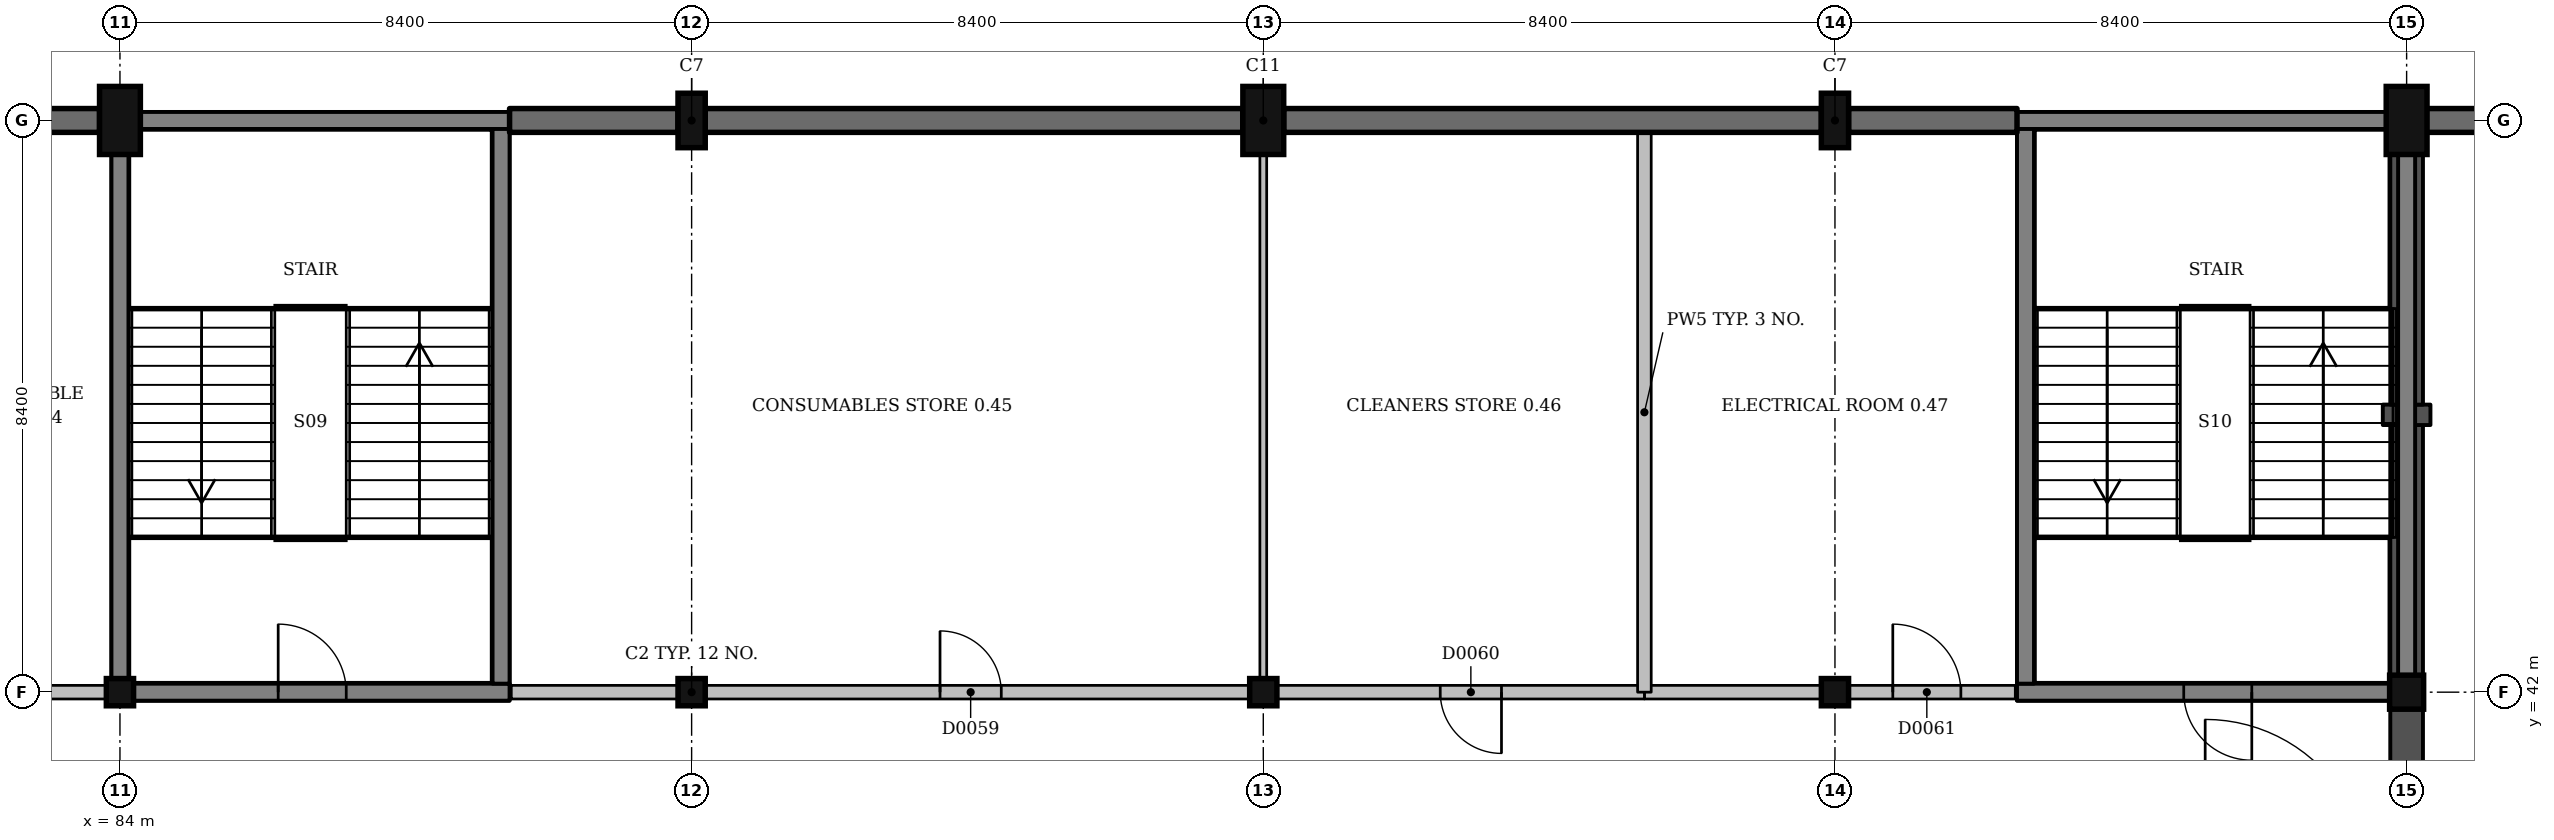
"""IFC4 building model, lengths in metres.
Left out: names, types, materials, properties, quantities, classifications, styles, units other than length and angle.
Written with IfcOpenShell. Run it as: python <this file> out.ifc"""

import sys

from ifc_helpers import new_model, si_unit, direction, frame, frame_2d, origin, origin_2d, place, context, subcontext, project, spatial, rectangle, extrude, element, fill, save


model = new_model("IFC4")
c1 = context("Model", 3, precision=1e-05, world=origin(), true_north=direction((0.0, 1.0)))
c2 = subcontext(c1, "Body", "Model", "MODEL_VIEW")
j1 = project(units=[si_unit("LENGTHUNIT", "METRE"), si_unit("PLANEANGLEUNIT", "RADIAN")], contexts=[c1])
p1 = place(None, origin())
s1 = spatial("IfcSite", under=j1, at=p1, CompositionType="ELEMENT")
p2 = place(p1, origin())
s2 = spatial("IfcBuilding", under=s1, at=p2, CompositionType="ELEMENT")
p3 = place(p2, origin())
s3 = spatial("IfcBuildingStorey", under=s2, at=p3, CompositionType="ELEMENT", Elevation=0.0)
p4 = place(p3, frame((84.0, 42.0, -1.5), z_axis=(0.0, 0.0, 1.0), x_axis=(1.0, 0.0, 0.0)))
e1 = element("IfcColumn", 1, at=p4, inside=s3, PredefinedType="COLUMN", context=c2, shape_type="SweptSolid", body=[
    extrude(rectangle(XDim=0.4, YDim=0.4, at=origin_2d()), origin(), (0.0, 0.0, 1.0), 6.0),
])
p5 = place(p3, frame((84.0, 50.4, -1.5), z_axis=(0.0, 0.0, 1.0), x_axis=(1.0, 0.0, 0.0)))
e2 = element("IfcColumn", 2, at=p5, inside=s3, PredefinedType="COLUMN", context=c2, shape_type="SweptSolid", body=[
    extrude(rectangle(XDim=0.6, YDim=1.0, at=origin_2d()), origin(), (0.0, 0.0, 1.0), 6.0),
])
p6 = place(p3, frame((92.4, 42.0, -1.5), z_axis=(0.0, 0.0, 1.0), x_axis=(1.0, 0.0, 0.0)))
e3 = element("IfcColumn", 3, at=p6, inside=s3, PredefinedType="COLUMN", context=c2, shape_type="SweptSolid", body=[
    extrude(rectangle(XDim=0.4, YDim=0.4, at=origin_2d()), origin(), (0.0, 0.0, 1.0), 6.0),
])
p7 = place(p3, frame((92.4, 50.4, -0.35), z_axis=(0.0, 0.0, 1.0), x_axis=(1.0, 0.0, 0.0)))
e4 = element("IfcColumn", 4, at=p7, inside=s3, PredefinedType="COLUMN", context=c2, shape_type="SweptSolid", body=[
    extrude(rectangle(XDim=0.4, YDim=0.8, at=origin_2d()), origin(), (0.0, 0.0, 1.0), 4.85),
])
p8 = place(p3, frame((100.8, 42.0, -1.5), z_axis=(0.0, 0.0, 1.0), x_axis=(1.0, 0.0, 0.0)))
e5 = element("IfcColumn", 5, at=p8, inside=s3, PredefinedType="COLUMN", context=c2, shape_type="SweptSolid", body=[
    extrude(rectangle(XDim=0.4, YDim=0.4, at=origin_2d()), origin(), (0.0, 0.0, 1.0), 6.0),
])
p9 = place(p3, frame((100.8, 50.4, -0.35), z_axis=(0.0, 0.0, 1.0), x_axis=(1.0, 0.0, 0.0)))
e6 = element("IfcColumn", 6, at=p9, inside=s3, PredefinedType="COLUMN", context=c2, shape_type="SweptSolid", body=[
    extrude(rectangle(XDim=0.6, YDim=1.0, at=origin_2d()), origin(), (0.0, 0.0, 1.0), 4.85),
])
p10 = place(p3, frame((109.2, 42.0, -1.5), z_axis=(0.0, 0.0, 1.0), x_axis=(1.0, 0.0, 0.0)))
e7 = element("IfcColumn", 7, at=p10, inside=s3, PredefinedType="COLUMN", context=c2, shape_type="SweptSolid", body=[
    extrude(rectangle(XDim=0.4, YDim=0.4, at=origin_2d()), origin(), (0.0, 0.0, 1.0), 6.0),
])
p11 = place(p3, frame((109.2, 50.4, -0.35), z_axis=(0.0, 0.0, 1.0), x_axis=(1.0, 0.0, 0.0)))
e8 = element("IfcColumn", 8, at=p11, inside=s3, PredefinedType="COLUMN", context=c2, shape_type="SweptSolid", body=[
    extrude(rectangle(XDim=0.4, YDim=0.8, at=origin_2d()), origin(), (0.0, 0.0, 1.0), 4.85),
])
p12 = place(p3, frame((117.6, 42.0, -1.5), z_axis=(0.0, 0.0, 1.0), x_axis=(1.0, 0.0, 0.0)))
e9 = element("IfcColumn", 9, at=p12, inside=s3, PredefinedType="COLUMN", context=c2, shape_type="SweptSolid", body=[
    extrude(rectangle(XDim=0.5, YDim=0.5, at=origin_2d()), origin(), (0.0, 0.0, 1.0), 6.0),
])
p13 = place(p3, frame((117.6, 50.4, -0.35), z_axis=(0.0, 0.0, 1.0), x_axis=(1.0, 0.0, 0.0)))
e10 = element("IfcColumn", 10, at=p13, inside=s3, PredefinedType="COLUMN", context=c2, shape_type="SweptSolid", body=[
    extrude(rectangle(XDim=0.6, YDim=1.0, at=origin_2d()), origin(), (0.0, 0.0, 1.0), 4.85),
])
p14 = place(p3, frame((84.2, 42.0, 0.0), z_axis=(0.0, 0.0, 1.0), x_axis=(1.0, 0.0, 0.0)))
e11 = element("IfcWall", 11, at=p14, inside=s3, PredefinedType="SHEAR", context=c2, shape_type="SweptSolid", body=[
    extrude(rectangle(XDim=5.525, YDim=0.25, at=frame_2d((2.763, 0.0))), origin(), (0.0, 0.0, 1.0), 4.5),
])
p15 = place(p14, frame((2.125, 0.0, 0.0)))
e12 = element("IfcOpeningElement", 12, at=p15, cuts=e11, PredefinedType="OPENING", context=c2, shape_type="SweptSolid", body=[
    extrude(rectangle(XDim=1.0, YDim=2.1, at=frame_2d((0.5, 1.05))), frame((0.0, 0.135, 0.0), z_axis=(0.0, -1.0, 0.0), x_axis=(1.0, 0.0, 0.0)), (0.0, 0.0, 1.0), 0.27),
])
p16 = place(p3, frame((84.3, 50.4, 0.0), z_axis=(0.0, 0.0, 1.0), x_axis=(1.0, 0.0, 0.0)))
e13 = element("IfcWall", 13, at=p16, inside=s3, PredefinedType="SHEAR", context=c2, shape_type="SweptSolid", body=[
    extrude(rectangle(XDim=5.425, YDim=0.25, at=frame_2d((2.712, 0.0))), origin(), (0.0, 0.0, 1.0), 4.5),
])
p17 = place(p3, frame((84.0, 42.2, 0.0), z_axis=(0.0, 0.0, 1.0), x_axis=(0.0, 1.0, 0.0)))
e14 = element("IfcWall", 14, at=p17, inside=s3, PredefinedType="SHEAR", context=c2, shape_type="SweptSolid", body=[
    extrude(rectangle(XDim=7.7, YDim=0.25, at=frame_2d((3.85, 0.0))), origin(), (0.0, 0.0, 1.0), 4.5),
])
p18 = place(p3, frame((89.6, 42.125, 0.0), z_axis=(0.0, 0.0, 1.0), x_axis=(0.0, 1.0, 0.0)))
e15 = element("IfcWall", 15, at=p18, inside=s3, PredefinedType="SHEAR", context=c2, shape_type="SweptSolid", body=[
    extrude(rectangle(XDim=8.15, YDim=0.25, at=frame_2d((4.075, 0.0))), origin(), (0.0, 0.0, 1.0), 4.5),
])
p19 = place(p3, frame((111.875, 42.0, 0.0), z_axis=(0.0, 0.0, 1.0), x_axis=(1.0, 0.0, 0.0)))
e16 = element("IfcWall", 16, at=p19, inside=s3, PredefinedType="SHEAR", context=c2, shape_type="SweptSolid", body=[
    extrude(rectangle(XDim=5.475, YDim=0.25, at=frame_2d((2.738, 0.0))), origin(), (0.0, 0.0, 1.0), 4.5),
])
p20 = place(p19, frame((2.45, 0.0, 0.0)))
e17 = element("IfcOpeningElement", 17, at=p20, cuts=e16, PredefinedType="OPENING", context=c2, shape_type="SweptSolid", body=[
    extrude(rectangle(XDim=1.0, YDim=2.1, at=frame_2d((0.5, 1.05))), frame((0.0, 0.135, 0.0), z_axis=(0.0, -1.0, 0.0), x_axis=(1.0, 0.0, 0.0)), (0.0, 0.0, 1.0), 0.27),
])
p21 = place(p3, frame((111.875, 50.4, 0.0), z_axis=(0.0, 0.0, 1.0), x_axis=(1.0, 0.0, 0.0)))
e18 = element("IfcWall", 18, at=p21, inside=s3, PredefinedType="SHEAR", context=c2, shape_type="SweptSolid", body=[
    extrude(rectangle(XDim=5.425, YDim=0.25, at=frame_2d((2.712, 0.0))), origin(), (0.0, 0.0, 1.0), 4.5),
])
p22 = place(p3, frame((112.0, 42.125, 0.0), z_axis=(0.0, 0.0, 1.0), x_axis=(0.0, 1.0, 0.0)))
e19 = element("IfcWall", 19, at=p22, inside=s3, PredefinedType="SHEAR", context=c2, shape_type="SweptSolid", body=[
    extrude(rectangle(XDim=8.15, YDim=0.25, at=frame_2d((4.075, 0.0))), origin(), (0.0, 0.0, 1.0), 4.5),
])
for number, where, z_axis, x_axis in (
    (20, (83.875, 42.0, -1.5), (0.0, 0.0, 1.0), (1.0, 0.0, 0.0)),
    (21, (83.875, 50.4, -1.5), (0.0, 0.0, 1.0), (1.0, 0.0, 0.0)),
):
    element("IfcWall", number, at=place(p3, frame(where, z_axis=z_axis, x_axis=x_axis)), inside=s3, PredefinedType="SHEAR", context=c2, shape_type="SweptSolid", body=[
        extrude(rectangle(XDim=5.85, YDim=0.25, at=frame_2d((2.925, 0.0))), origin(), (0.0, 0.0, 1.0), 1.5),
    ])
for number, where, z_axis, x_axis in (
    (22, (84.0, 42.125, -1.5), (0.0, 0.0, 1.0), (0.0, 1.0, 0.0)),
    (23, (89.6, 42.125, -1.5), (0.0, 0.0, 1.0), (0.0, 1.0, 0.0)),
):
    element("IfcWall", number, at=place(p3, frame(where, z_axis=z_axis, x_axis=x_axis)), inside=s3, PredefinedType="SHEAR", context=c2, shape_type="SweptSolid", body=[
        extrude(rectangle(XDim=8.15, YDim=0.25, at=frame_2d((4.075, 0.0))), origin(), (0.0, 0.0, 1.0), 1.5),
    ])
for number, where, z_axis, x_axis in (
    (24, (111.875, 42.0, -1.5), (0.0, 0.0, 1.0), (1.0, 0.0, 0.0)),
    (25, (111.875, 50.4, -1.5), (0.0, 0.0, 1.0), (1.0, 0.0, 0.0)),
):
    element("IfcWall", number, at=place(p3, frame(where, z_axis=z_axis, x_axis=x_axis)), inside=s3, PredefinedType="SHEAR", context=c2, shape_type="SweptSolid", body=[
        extrude(rectangle(XDim=5.85, YDim=0.25, at=frame_2d((2.925, 0.0))), origin(), (0.0, 0.0, 1.0), 1.5),
    ])
for number, where, z_axis, x_axis in (
    (26, (112.0, 42.125, -1.5), (0.0, 0.0, 1.0), (0.0, 1.0, 0.0)),
    (27, (117.6, 42.125, -1.5), (0.0, 0.0, 1.0), (0.0, 1.0, 0.0)),
):
    element("IfcWall", number, at=place(p3, frame(where, z_axis=z_axis, x_axis=x_axis)), inside=s3, PredefinedType="SHEAR", context=c2, shape_type="SweptSolid", body=[
        extrude(rectangle(XDim=8.15, YDim=0.25, at=frame_2d((4.075, 0.0))), origin(), (0.0, 0.0, 1.0), 1.5),
    ])
for number, where, z_axis, x_axis in (
    (28, (109.0, 50.4, -0.35), (0.0, 0.0, 1.0), (-1.0, 0.0, 0.0)),
    (29, (100.5, 50.4, -0.35), (0.0, 0.0, 1.0), (-1.0, 0.0, 0.0)),
    (30, (83.7, 50.4, -0.35), (0.0, 0.0, 1.0), (-1.0, 0.0, 0.0)),
):
    element("IfcWall", number, at=place(p3, frame(where, z_axis=z_axis, x_axis=x_axis)), inside=s3, PredefinedType="SOLIDWALL", context=c2, shape_type="SweptSolid", body=[
        extrude(rectangle(XDim=7.9, YDim=0.35, at=frame_2d((3.95, 0.0))), origin(), (0.0, 0.0, 1.0), 3.8),
    ])
p23 = place(p3, frame((117.6, 50.4, 0.0), z_axis=(0.0, 0.0, 1.0), x_axis=(1.0, 0.0, 0.0)))
e31 = element("IfcWall", 31, at=p23, inside=s3, PredefinedType="SOLIDWALL", context=c2, shape_type="SweptSolid", body=[
    extrude(rectangle(XDim=8.4, YDim=0.35, at=frame_2d((4.2, 0.0))), origin(), (0.0, 0.0, 1.0), 4.25),
])
p24 = place(p3, frame((117.6, 37.95, 0.0), z_axis=(0.0, 0.0, 1.0), x_axis=(0.0, 1.0, 0.0)))
e32 = element("IfcWall", 32, at=p24, inside=s3, PredefinedType="SOLIDWALL", context=c2, shape_type="SweptSolid", body=[
    extrude(rectangle(XDim=3.8, YDim=0.48, at=frame_2d((1.9, 0.0))), origin(), (0.0, 0.0, 1.0), 3.75),
])
p25 = place(p24, frame((2.4, 0.0, 0.0), z_axis=(0.0, 0.0, 1.0), x_axis=(-1.0, 0.0, 0.0)))
e33 = element("IfcOpeningElement", 33, at=p25, cuts=e32, PredefinedType="OPENING", context=c2, shape_type="SweptSolid", body=[
    extrude(rectangle(XDim=1.0, YDim=2.1, at=frame_2d((0.5, 1.05))), frame((0.0, 0.25, 0.0), z_axis=(0.0, -1.0, 0.0), x_axis=(1.0, 0.0, 0.0)), (0.0, 0.0, 1.0), 0.5),
])
p26 = place(p3, frame((117.6, 42.25, 0.0), z_axis=(0.0, 0.0, 1.0), x_axis=(0.0, 1.0, 0.0)))
e34 = element("IfcWall", 34, at=p26, inside=s3, PredefinedType="SOLIDWALL", context=c2, shape_type="SweptSolid", body=[
    extrude(rectangle(XDim=3.675, YDim=0.48, at=frame_2d((1.837, 0.0))), origin(), (0.0, 0.0, 1.0), 3.75),
])
p27 = place(p3, frame((117.6, 45.925, 0.0), z_axis=(0.0, 0.0, 1.0), x_axis=(0.0, 1.0, 0.0)))
e35 = element("IfcWall", 35, at=p27, inside=s3, PredefinedType="SOLIDWALL", context=c2, shape_type="SweptSolid", body=[
    extrude(rectangle(XDim=0.3, YDim=0.7, at=frame_2d((0.15, 0.0))), origin(), (0.0, 0.0, 1.0), 3.75),
])
p28 = place(p3, frame((117.6, 46.225, 0.0), z_axis=(0.0, 0.0, 1.0), x_axis=(0.0, 1.0, 0.0)))
e36 = element("IfcWall", 36, at=p28, inside=s3, PredefinedType="SOLIDWALL", context=c2, shape_type="SweptSolid", body=[
    extrude(rectangle(XDim=3.675, YDim=0.48, at=frame_2d((1.837, 0.0))), origin(), (0.0, 0.0, 1.0), 3.75),
])
p29 = place(p3, frame((106.4, 42.0, 0.0), z_axis=(0.0, 0.0, 1.0), x_axis=(1.0, 0.0, 0.0)))
e37 = element("IfcWall", 37, at=p29, inside=s3, PredefinedType="PARTITIONING", context=c2, shape_type="SweptSolid", body=[
    extrude(rectangle(XDim=2.6, YDim=0.2, at=frame_2d((1.3, 0.0))), origin(), (0.0, 0.0, 1.0), 3.45),
])
p30 = place(p3, frame((109.4, 42.0, 0.0), z_axis=(0.0, 0.0, 1.0), x_axis=(1.0, 0.0, 0.0)))
e38 = element("IfcWall", 38, at=p30, inside=s3, PredefinedType="PARTITIONING", context=c2, shape_type="SweptSolid", body=[
    extrude(rectangle(XDim=2.45, YDim=0.2, at=frame_2d((1.225, 0.0))), origin(), (0.0, 0.0, 1.0), 3.45),
])
p31 = place(p30, frame((0.65, 0.0, 0.0)))
e39 = element("IfcOpeningElement", 39, at=p31, cuts=e38, PredefinedType="OPENING", context=c2, shape_type="SweptSolid", body=[
    extrude(rectangle(XDim=1.0, YDim=2.1, at=frame_2d((0.5, 1.05))), frame((0.0, 0.11, 0.0), z_axis=(0.0, -1.0, 0.0), x_axis=(1.0, 0.0, 0.0)), (0.0, 0.0, 1.0), 0.22),
])
p32 = place(p3, frame((75.8, 42.0, 0.0), z_axis=(0.0, 0.0, 1.0), x_axis=(1.0, 0.0, 0.0)))
e40 = element("IfcWall", 40, at=p32, inside=s3, PredefinedType="PARTITIONING", context=c2, shape_type="SweptSolid", body=[
    extrude(rectangle(XDim=8.0, YDim=0.2, at=frame_2d((4.0, 0.0))), origin(), (0.0, 0.0, 1.0), 3.45),
])
p33 = place(p32, frame((1.0, 0.0, 0.0)))
e41 = element("IfcOpeningElement", 41, at=p33, cuts=e40, PredefinedType="OPENING", context=c2, shape_type="SweptSolid", body=[
    extrude(rectangle(XDim=0.9, YDim=2.1, at=frame_2d((0.45, 1.05))), frame((0.0, 0.11, 0.0), z_axis=(0.0, -1.0, 0.0), x_axis=(1.0, 0.0, 0.0)), (0.0, 0.0, 1.0), 0.22),
])
p34 = place(p32, frame((3.6, 0.0, 0.0)))
e42 = element("IfcOpeningElement", 42, at=p34, cuts=e40, PredefinedType="OPENING", context=c2, shape_type="SweptSolid", body=[
    extrude(rectangle(XDim=0.9, YDim=2.1, at=frame_2d((0.45, 1.05))), frame((0.0, 0.11, 0.0), z_axis=(0.0, -1.0, 0.0), x_axis=(1.0, 0.0, 0.0)), (0.0, 0.0, 1.0), 0.22),
])
p35 = place(p32, frame((6.05, 0.0, 0.0)))
e43 = element("IfcOpeningElement", 43, at=p35, cuts=e40, PredefinedType="OPENING", context=c2, shape_type="SweptSolid", body=[
    extrude(rectangle(XDim=1.0, YDim=2.1, at=frame_2d((0.5, 1.05))), frame((0.0, 0.11, 0.0), z_axis=(0.0, -1.0, 0.0), x_axis=(1.0, 0.0, 0.0)), (0.0, 0.0, 1.0), 0.22),
])
p36 = place(p3, frame((89.75, 42.0, 0.0), z_axis=(0.0, 0.0, 1.0), x_axis=(1.0, 0.0, 0.0)))
e44 = element("IfcWall", 44, at=p36, inside=s3, PredefinedType="PARTITIONING", context=c2, shape_type="SweptSolid", body=[
    extrude(rectangle(XDim=2.45, YDim=0.2, at=frame_2d((1.225, 0.0))), origin(), (0.0, 0.0, 1.0), 3.45),
])
p37 = place(p3, frame((92.6, 42.0, 0.0), z_axis=(0.0, 0.0, 1.0), x_axis=(1.0, 0.0, 0.0)))
e45 = element("IfcWall", 45, at=p37, inside=s3, PredefinedType="PARTITIONING", context=c2, shape_type="SweptSolid", body=[
    extrude(rectangle(XDim=8.0, YDim=0.2, at=frame_2d((4.0, 0.0))), origin(), (0.0, 0.0, 1.0), 3.45),
])
p38 = place(p37, frame((3.45, 0.0, 0.0)))
e46 = element("IfcOpeningElement", 46, at=p38, cuts=e45, PredefinedType="OPENING", context=c2, shape_type="SweptSolid", body=[
    extrude(rectangle(XDim=0.9, YDim=2.1, at=frame_2d((0.45, 1.05))), frame((0.0, 0.11, 0.0), z_axis=(0.0, -1.0, 0.0), x_axis=(1.0, 0.0, 0.0)), (0.0, 0.0, 1.0), 0.22),
])
p39 = place(p3, frame((101.0, 42.0, 0.0), z_axis=(0.0, 0.0, 1.0), x_axis=(1.0, 0.0, 0.0)))
e47 = element("IfcWall", 47, at=p39, inside=s3, PredefinedType="PARTITIONING", context=c2, shape_type="SweptSolid", body=[
    extrude(rectangle(XDim=5.4, YDim=0.2, at=frame_2d((2.7, 0.0))), origin(), (0.0, 0.0, 1.0), 3.45),
])
p40 = place(p39, frame((2.4, 0.0, 0.0)))
e48 = element("IfcOpeningElement", 48, at=p40, cuts=e47, PredefinedType="OPENING", context=c2, shape_type="SweptSolid", body=[
    extrude(rectangle(XDim=0.9, YDim=2.1, at=frame_2d((0.45, 1.05))), frame((0.0, 0.11, 0.0), z_axis=(0.0, -1.0, 0.0), x_axis=(1.0, 0.0, 0.0)), (0.0, 0.0, 1.0), 0.22),
])
p41 = place(p3, frame((100.8, 42.2, 0.0), z_axis=(0.0, 0.0, 1.0), x_axis=(0.0, 1.0, 0.0)))
e49 = element("IfcWall", 49, at=p41, inside=s3, PredefinedType="PARTITIONING", context=c2, shape_type="SweptSolid", body=[
    extrude(rectangle(XDim=7.7, YDim=0.1, at=frame_2d((3.85, 0.0))), origin(), (0.0, 0.0, 1.0), 3.5),
])
p42 = place(p3, frame((106.4, 42.0, 0.0), z_axis=(0.0, 0.0, 1.0), x_axis=(0.0, 1.0, 0.0)))
e50 = element("IfcWall", 50, at=p42, inside=s3, PredefinedType="PARTITIONING", context=c2, shape_type="SweptSolid", body=[
    extrude(rectangle(XDim=8.225, YDim=0.2, at=frame_2d((4.113, 0.0))), origin(), (0.0, 0.0, 1.0), 3.45),
])
p43 = place(p3, frame((92.2, 50.4, -0.35), z_axis=(0.0, 0.0, 1.0), x_axis=(-1.0, 0.0, 0.0)))
e51 = element("IfcWall", 51, at=p43, inside=s3, PredefinedType="SOLIDWALL", context=c2, shape_type="SweptSolid", body=[
    extrude(rectangle(XDim=2.475, YDim=0.35, at=frame_2d((1.237, 0.0))), origin(), (0.0, 0.0, 1.0), 3.8),
])
p44 = place(p3, frame((111.875, 50.4, -0.35), z_axis=(0.0, 0.0, 1.0), x_axis=(-1.0, 0.0, 0.0)))
e52 = element("IfcWall", 52, at=p44, inside=s3, PredefinedType="SOLIDWALL", context=c2, shape_type="SweptSolid", body=[
    extrude(rectangle(XDim=2.475, YDim=0.35, at=frame_2d((1.238, 0.0))), origin(), (0.0, 0.0, 1.0), 3.8),
])
p45 = place(p38, origin())
e53 = element("IfcDoor", 53, at=p45, inside=s3, OperationType="SINGLE_SWING_LEFT", PredefinedType="DOOR", context=c2, shape_type="SweptSolid", body=[
    extrude(rectangle(XDim=0.9, YDim=2.1, at=frame_2d((0.45, 1.05))), frame((0.0, 0.025, 0.0), z_axis=(0.0, -1.0, 0.0), x_axis=(1.0, 0.0, 0.0)), (0.0, 0.0, 1.0), 0.05),
])
fill(e46, e53)
p46 = place(p40, origin())
e54 = element("IfcDoor", 54, at=p46, inside=s3, OperationType="SINGLE_SWING_RIGHT", PredefinedType="DOOR", context=c2, shape_type="SweptSolid", body=[
    extrude(rectangle(XDim=0.9, YDim=2.1, at=frame_2d((0.45, 1.05))), frame((0.0, 0.025, 0.0), z_axis=(0.0, -1.0, 0.0), x_axis=(1.0, 0.0, 0.0)), (0.0, 0.0, 1.0), 0.05),
])
fill(e48, e54)
p47 = place(p31, origin())
e55 = element("IfcDoor", 55, at=p47, inside=s3, OperationType="SINGLE_SWING_LEFT", PredefinedType="DOOR", context=c2, shape_type="SweptSolid", body=[
    extrude(rectangle(XDim=1.0, YDim=2.1, at=frame_2d((0.5, 1.05))), frame((0.0, 0.025, 0.0), z_axis=(0.0, -1.0, 0.0), x_axis=(1.0, 0.0, 0.0)), (0.0, 0.0, 1.0), 0.05),
])
fill(e39, e55)
p48 = place(p15, origin())
e56 = element("IfcDoor", 56, at=p48, inside=s3, OperationType="SINGLE_SWING_LEFT", PredefinedType="DOOR", context=c2, shape_type="SweptSolid", body=[
    extrude(rectangle(XDim=1.0, YDim=2.1, at=frame_2d((0.5, 1.05))), frame((0.0, 0.025, 0.0), z_axis=(0.0, -1.0, 0.0), x_axis=(1.0, 0.0, 0.0)), (0.0, 0.0, 1.0), 0.05),
])
fill(e12, e56)
p49 = place(p20, origin())
e57 = element("IfcDoor", 57, at=p49, inside=s3, OperationType="SINGLE_SWING_RIGHT", PredefinedType="DOOR", context=c2, shape_type="SweptSolid", body=[
    extrude(rectangle(XDim=1.0, YDim=2.1, at=frame_2d((0.5, 1.05))), frame((0.0, 0.025, 0.0), z_axis=(0.0, -1.0, 0.0), x_axis=(1.0, 0.0, 0.0)), (0.0, 0.0, 1.0), 0.05),
])
fill(e17, e57)
save(model, sys.argv[1])
